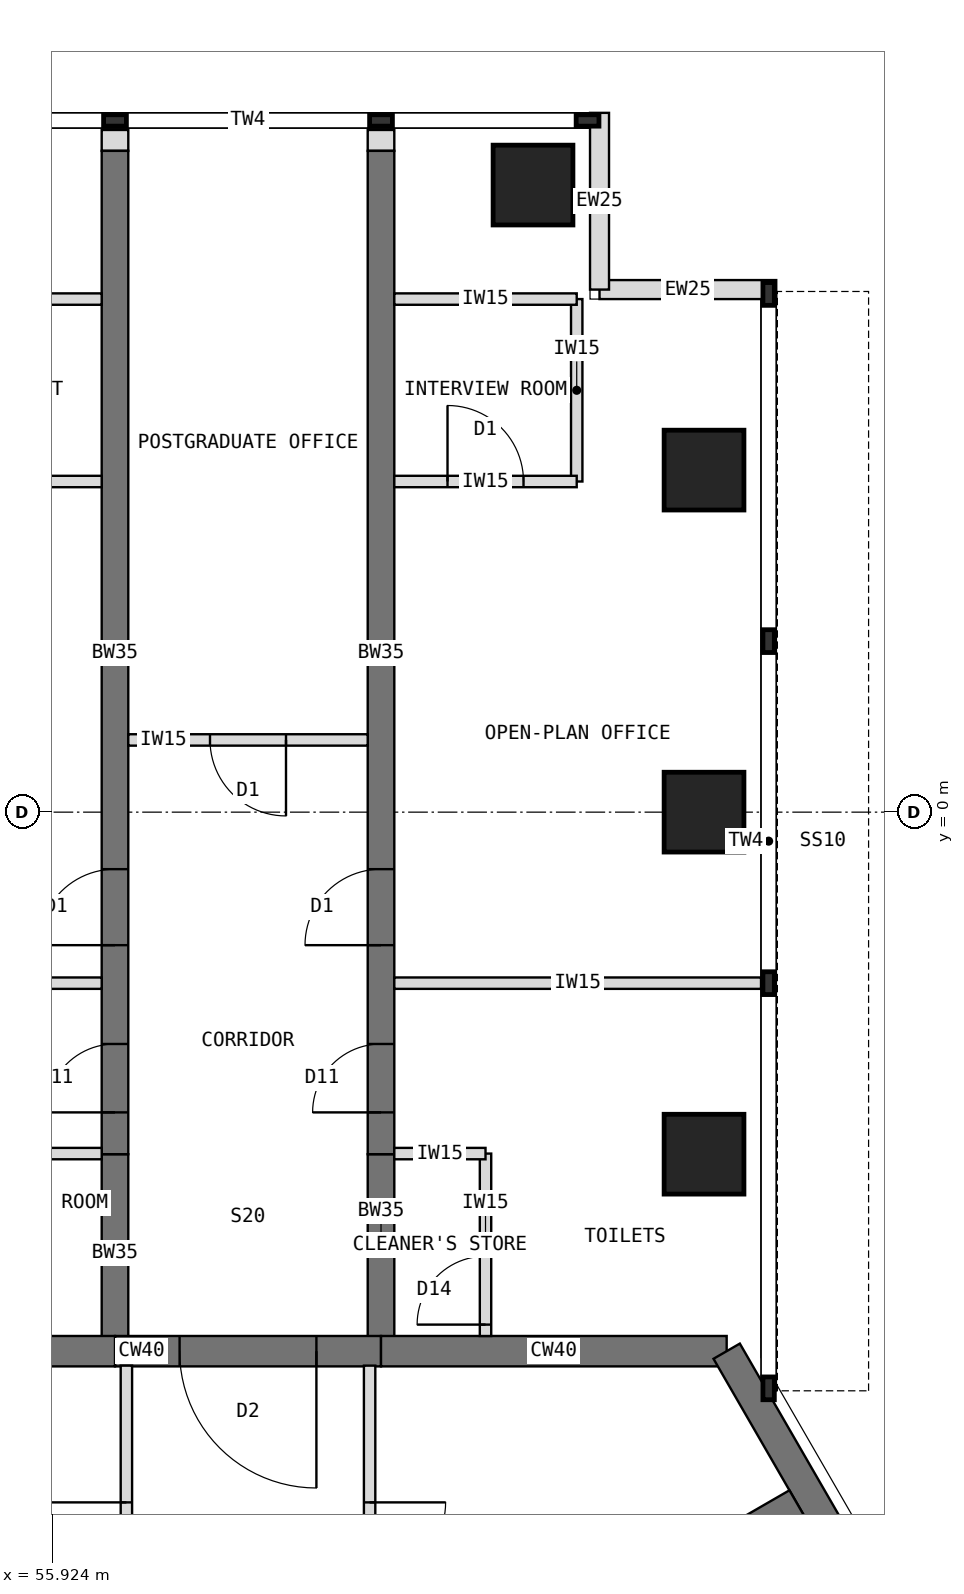
"""IFC4 building model, lengths in metres.
Left out: names, types, materials, properties, quantities, classifications, styles, units other than length and angle.
Written with IfcOpenShell. Run it as: python <this file> out.ifc"""

import sys

from ifc_helpers import new_model, si_unit, direction, frame, frame_2d, origin, origin_2d, place, context, subcontext, project, spatial, rectangle, extrude, element, fill, save


model = new_model("IFC4")
c1 = context("Model", 3, precision=1e-05, world=origin(), true_north=direction((0.0, 1.0)))
c2 = subcontext(c1, "Body", "Model", "MODEL_VIEW")
j1 = project(units=[si_unit("LENGTHUNIT", "METRE"), si_unit("PLANEANGLEUNIT", "RADIAN")], contexts=[c1])
p1 = place(None, origin())
s1 = spatial("IfcSite", under=j1, at=p1, CompositionType="ELEMENT")
p2 = place(p1, origin())
s2 = spatial("IfcBuilding", under=s1, at=p2, CompositionType="ELEMENT")
p3 = place(p2, frame((0.0, 0.0, 251.5)))
s3 = spatial("IfcBuildingStorey", under=s2, at=p3, CompositionType="ELEMENT", Elevation=251.5)
p4 = place(p3, frame((64.798, -7.092, 0.0), z_axis=(0.0, 0.0, 1.0), x_axis=(-1.0, 0.0, 0.0)))
e1 = element("IfcWall", 1, at=p4, inside=s3, PredefinedType="SHEAR", context=c2, shape_type="SweptSolid", body=[
    extrude(rectangle(XDim=4.548, YDim=0.4, at=frame_2d((2.274, 0.0))), origin(), (0.0, 0.0, 1.0), 4.0),
])
p5 = place(p3, frame((60.25, -7.092, 0.0), z_axis=(0.0, 0.0, 1.0), x_axis=(-1.0, 0.0, 0.0)))
e2 = element("IfcWall", 2, at=p5, inside=s3, PredefinedType="SHEAR", context=c2, shape_type="SweptSolid", body=[
    extrude(rectangle(XDim=3.5, YDim=0.4, at=frame_2d((1.75, 0.0))), origin(), (0.0, 0.0, 1.0), 4.0),
])
p6 = place(p5, frame((0.85, 0.0, 0.0)))
e3 = element("IfcOpeningElement", 3, at=p6, cuts=e2, PredefinedType="OPENING", context=c2, shape_type="SweptSolid", body=[
    extrude(rectangle(XDim=1.8, YDim=2.1, at=frame_2d((0.9, 1.05))), frame((0.0, 0.21, 0.0), z_axis=(0.0, -1.0, 0.0), x_axis=(1.0, 0.0, 0.0)), (0.0, 0.0, 1.0), 0.42),
])
p7 = place(p3, frame((56.75, -7.092, 0.0), z_axis=(0.0, 0.0, 1.0), x_axis=(-1.0, 0.0, 0.0)))
e4 = element("IfcWall", 4, at=p7, inside=s3, PredefinedType="SHEAR", context=c2, shape_type="SweptSolid", body=[
    extrude(rectangle(XDim=4.548, YDim=0.4, at=frame_2d((2.274, 0.0))), origin(), (0.0, 0.0, 1.0), 4.0),
])
p8 = place(p3, frame((71.096, -18.0, 0.0), z_axis=(0.0, 0.0, 1.0), x_axis=(-0.500005998175, 0.866021940709, 0.0)))
e5 = element("IfcWall", 5, at=p8, inside=s3, PredefinedType="SHEAR", context=c2, shape_type="SweptSolid", body=[
    extrude(rectangle(XDim=12.596, YDim=0.4, at=frame_2d((6.298, 0.0))), origin(), (0.0, 0.0, 1.0), 4.0),
])
p9 = place(p3, frame((56.75, -7.092, 0.0), z_axis=(0.0, 0.0, 1.0), x_axis=(0.0, 1.0, 0.0)))
e6 = element("IfcWall", 6, at=p9, inside=s3, PredefinedType="SHEAR", context=c2, shape_type="SweptSolid", body=[
    extrude(rectangle(XDim=2.592, YDim=0.35, at=frame_2d((1.296, 0.0))), origin(), (0.0, 0.0, 1.0), 4.0),
])
p10 = place(p3, frame((56.75, -4.5, 0.0), z_axis=(0.0, 0.0, 1.0), x_axis=(0.0, 1.0, 0.0)))
e7 = element("IfcWall", 7, at=p10, inside=s3, PredefinedType="SHEAR", context=c2, shape_type="SweptSolid", body=[
    extrude(rectangle(XDim=13.2, YDim=0.35, at=frame_2d((6.6, 0.0))), origin(), (0.0, 0.0, 1.0), 4.0),
])
p11 = place(p10, frame((0.55, 0.0, 0.0)))
e8 = element("IfcOpeningElement", 8, at=p11, cuts=e7, PredefinedType="OPENING", context=c2, shape_type="SweptSolid", body=[
    extrude(rectangle(XDim=0.9, YDim=2.1, at=frame_2d((0.45, 1.05))), frame((0.0, 0.185, 0.0), z_axis=(0.0, -1.0, 0.0), x_axis=(1.0, 0.0, 0.0)), (0.0, 0.0, 1.0), 0.37),
])
p12 = place(p10, frame((2.75, 0.0, 0.0)))
e9 = element("IfcOpeningElement", 9, at=p12, cuts=e7, PredefinedType="OPENING", context=c2, shape_type="SweptSolid", body=[
    extrude(rectangle(XDim=1.0, YDim=2.1, at=frame_2d((0.5, 1.05))), frame((0.0, 0.185, 0.0), z_axis=(0.0, -1.0, 0.0), x_axis=(1.0, 0.0, 0.0)), (0.0, 0.0, 1.0), 0.37),
])
p13 = place(p3, frame((60.25, -7.092, 0.0), z_axis=(0.0, 0.0, 1.0), x_axis=(0.0, 1.0, 0.0)))
e10 = element("IfcWall", 10, at=p13, inside=s3, PredefinedType="SHEAR", context=c2, shape_type="SweptSolid", body=[
    extrude(rectangle(XDim=2.592, YDim=0.35, at=frame_2d((1.296, 0.0))), origin(), (0.0, 0.0, 1.0), 4.0),
])
p14 = place(p3, frame((60.25, -4.5, 0.0), z_axis=(0.0, 0.0, 1.0), x_axis=(0.0, 1.0, 0.0)))
e11 = element("IfcWall", 11, at=p14, inside=s3, PredefinedType="SHEAR", context=c2, shape_type="SweptSolid", body=[
    extrude(rectangle(XDim=13.2, YDim=0.35, at=frame_2d((6.6, 0.0))), origin(), (0.0, 0.0, 1.0), 4.0),
])
p15 = place(p14, frame((0.55, 0.0, 0.0)))
e12 = element("IfcOpeningElement", 12, at=p15, cuts=e11, PredefinedType="OPENING", context=c2, shape_type="SweptSolid", body=[
    extrude(rectangle(XDim=0.9, YDim=2.1, at=frame_2d((0.45, 1.05))), frame((0.0, 0.185, 0.0), z_axis=(0.0, -1.0, 0.0), x_axis=(1.0, 0.0, 0.0)), (0.0, 0.0, 1.0), 0.37),
])
p16 = place(p14, frame((2.75, 0.0, 0.0)))
e13 = element("IfcOpeningElement", 13, at=p16, cuts=e11, PredefinedType="OPENING", context=c2, shape_type="SweptSolid", body=[
    extrude(rectangle(XDim=1.0, YDim=2.1, at=frame_2d((0.5, 1.05))), frame((0.0, 0.185, 0.0), z_axis=(0.0, -1.0, 0.0), x_axis=(1.0, 0.0, 0.0)), (0.0, 0.0, 1.0), 0.37),
])
for number, where, z_axis, x_axis in (
    (14, (64.5, -4.5, 0.0), (0.0, 0.0, 1.0), (1.0, 0.0, 0.0)),
    (15, (64.5, 0.0, 0.0), (0.0, 0.0, 1.0), (1.0, 0.0, 0.0)),
    (16, (64.5, 4.5, 0.0), (0.0, 0.0, 1.0), (1.0, 0.0, 0.0)),
    (17, (62.25, 8.25, 0.0), (0.0, 0.0, 1.0), (1.0, 0.0, 0.0)),
):
    element("IfcColumn", number, at=place(p3, frame(where, z_axis=z_axis, x_axis=x_axis)), inside=s3, PredefinedType="COLUMN", context=c2, shape_type="SweptSolid", body=[
        extrude(rectangle(XDim=1.05, YDim=1.05, at=origin_2d()), origin(), (0.0, 0.0, 1.0), 4.0),
    ])
for number, where, z_axis, x_axis in (
    (18, (65.45, 6.875, 0.0), (0.0, 0.0, 1.0), (-1.0, 0.0, 0.0)),
    (19, (63.125, 6.875, 0.0), (0.0, 0.0, 1.0), (0.0, 1.0, 0.0)),
):
    element("IfcWall", number, at=place(p3, frame(where, z_axis=z_axis, x_axis=x_axis)), inside=s3, PredefinedType="STANDARD", context=c2, shape_type="SweptSolid", body=[
        extrude(rectangle(XDim=2.325, YDim=0.25, at=frame_2d((1.163, 0.0))), origin(), (0.0, 0.0, 1.0), 3.8),
    ])
for number, where, z_axis, x_axis in (
    (20, (56.75, 8.7, 0.0), (0.0, 0.0, 1.0), (0.0, 1.0, 0.0)),
    (21, (60.25, 8.7, 0.0), (0.0, 0.0, 1.0), (0.0, 1.0, 0.0)),
):
    element("IfcWall", number, at=place(p3, frame(where, z_axis=z_axis, x_axis=x_axis)), inside=s3, PredefinedType="PARTITIONING", context=c2, shape_type="SweptSolid", body=[
        extrude(rectangle(XDim=0.275, YDim=0.35, at=frame_2d((0.138, 0.0))), origin(), (0.0, 0.0, 1.0), 3.8),
    ])
for number, where, z_axis, x_axis in (
    (22, (56.48, -12.099, 0.0), (0.0, 0.0, 1.0), (-0.866, 0.5, 0.0)),
    (23, (60.52, -12.099, 0.0), (0.0, 0.0, 1.0), (0.866, 0.5, 0.0)),
):
    element("IfcWall", number, at=place(p3, frame(where, z_axis=z_axis, x_axis=x_axis)), inside=s3, PredefinedType="SHEAR", context=c2, shape_type="SweptSolid", body=[
        extrude(rectangle(XDim=6.008, YDim=0.4, at=frame_2d((3.004, 0.0))), origin(), (0.0, 0.0, 1.0), 4.0),
    ])
p17 = place(p3, frame((56.575, -2.25, 0.0), z_axis=(0.0, 0.0, 1.0), x_axis=(-1.0, 0.0, 0.0)))
e24 = element("IfcWall", 24, at=p17, inside=s3, PredefinedType="PARTITIONING", context=c2, shape_type="SweptSolid", body=[
    extrude(rectangle(XDim=4.825, YDim=0.15, at=frame_2d((2.413, 0.0))), origin(), (0.0, 0.0, 1.0), 3.8),
])
p18 = place(p3, frame((56.575, 4.35, 0.0), z_axis=(0.0, 0.0, 1.0), x_axis=(-1.0, 0.0, 0.0)))
e25 = element("IfcWall", 25, at=p18, inside=s3, PredefinedType="PARTITIONING", context=c2, shape_type="SweptSolid", body=[
    extrude(rectangle(XDim=2.4, YDim=0.15, at=frame_2d((1.2, 0.0))), origin(), (0.0, 0.0, 1.0), 3.8),
])
p19 = place(p18, frame((0.7, 0.0, 0.0)))
e26 = element("IfcOpeningElement", 26, at=p19, cuts=e25, PredefinedType="OPENING", context=c2, shape_type="SweptSolid", body=[
    extrude(rectangle(XDim=1.0, YDim=2.1, at=frame_2d((0.5, 1.05))), frame((0.0, 0.085, 0.0), z_axis=(0.0, -1.0, 0.0), x_axis=(1.0, 0.0, 0.0)), (0.0, 0.0, 1.0), 0.17),
])
p20 = place(p3, frame((56.575, 6.75, 0.0), z_axis=(0.0, 0.0, 1.0), x_axis=(-1.0, 0.0, 0.0)))
e27 = element("IfcWall", 27, at=p20, inside=s3, PredefinedType="PARTITIONING", context=c2, shape_type="SweptSolid", body=[
    extrude(rectangle(XDim=2.4, YDim=0.15, at=frame_2d((1.2, 0.0))), origin(), (0.0, 0.0, 1.0), 3.8),
])
p21 = place(p3, frame((56.575, -4.492, 0.0), z_axis=(0.0, 0.0, 1.0), x_axis=(-1.0, 0.0, 0.0)))
e28 = element("IfcWall", 28, at=p21, inside=s3, PredefinedType="PARTITIONING", context=c2, shape_type="SweptSolid", body=[
    extrude(rectangle(XDim=3.2, YDim=0.15, at=frame_2d((1.6, 0.0))), origin(), (0.0, 0.0, 1.0), 3.267),
])
p22 = place(p3, frame((60.425, -2.25, 0.0), z_axis=(0.0, 0.0, 1.0), x_axis=(1.0, 0.0, 0.0)))
e29 = element("IfcWall", 29, at=p22, inside=s3, PredefinedType="PARTITIONING", context=c2, shape_type="SweptSolid", body=[
    extrude(rectangle(XDim=4.825, YDim=0.15, at=frame_2d((2.413, 0.0))), origin(), (0.0, 0.0, 1.0), 3.8),
])
p23 = place(p3, frame((62.825, 4.35, 0.0), z_axis=(0.0, 0.0, 1.0), x_axis=(0.0, 1.0, 0.0)))
e30 = element("IfcWall", 30, at=p23, inside=s3, PredefinedType="PARTITIONING", context=c2, shape_type="SweptSolid", body=[
    extrude(rectangle(XDim=2.4, YDim=0.15, at=frame_2d((1.2, 0.0))), origin(), (0.0, 0.0, 1.0), 3.8),
])
p24 = place(p3, frame((60.425, 4.35, 0.0), z_axis=(0.0, 0.0, 1.0), x_axis=(1.0, 0.0, 0.0)))
e31 = element("IfcWall", 31, at=p24, inside=s3, PredefinedType="PARTITIONING", context=c2, shape_type="SweptSolid", body=[
    extrude(rectangle(XDim=2.4, YDim=0.15, at=frame_2d((1.2, 0.0))), origin(), (0.0, 0.0, 1.0), 3.8),
])
p25 = place(p24, frame((0.7, 0.0, 0.0)))
e32 = element("IfcOpeningElement", 32, at=p25, cuts=e31, PredefinedType="OPENING", context=c2, shape_type="SweptSolid", body=[
    extrude(rectangle(XDim=1.0, YDim=2.1, at=frame_2d((0.5, 1.05))), frame((0.0, 0.085, 0.0), z_axis=(0.0, -1.0, 0.0), x_axis=(1.0, 0.0, 0.0)), (0.0, 0.0, 1.0), 0.17),
])
p26 = place(p3, frame((60.425, 6.75, 0.0), z_axis=(0.0, 0.0, 1.0), x_axis=(1.0, 0.0, 0.0)))
e33 = element("IfcWall", 33, at=p26, inside=s3, PredefinedType="PARTITIONING", context=c2, shape_type="SweptSolid", body=[
    extrude(rectangle(XDim=2.4, YDim=0.15, at=frame_2d((1.2, 0.0))), origin(), (0.0, 0.0, 1.0), 3.8),
])
p27 = place(p3, frame((61.625, -6.892, 0.0), z_axis=(0.0, 0.0, 1.0), x_axis=(0.0, 1.0, 0.0)))
e34 = element("IfcWall", 34, at=p27, inside=s3, PredefinedType="PARTITIONING", context=c2, shape_type="SweptSolid", body=[
    extrude(rectangle(XDim=2.4, YDim=0.15, at=frame_2d((1.2, 0.0))), origin(), (0.0, 0.0, 1.0), 3.8),
])
p28 = place(p27, frame((0.15, 0.0, 0.0)))
e35 = element("IfcOpeningElement", 35, at=p28, cuts=e34, PredefinedType="OPENING", context=c2, shape_type="SweptSolid", body=[
    extrude(rectangle(XDim=0.9, YDim=2.1, at=frame_2d((0.45, 1.05))), frame((0.0, 0.085, 0.0), z_axis=(0.0, -1.0, 0.0), x_axis=(1.0, 0.0, 0.0)), (0.0, 0.0, 1.0), 0.17),
])
p29 = place(p3, frame((60.425, -4.492, 0.0), z_axis=(0.0, 0.0, 1.0), x_axis=(1.0, 0.0, 0.0)))
e36 = element("IfcWall", 36, at=p29, inside=s3, PredefinedType="PARTITIONING", context=c2, shape_type="SweptSolid", body=[
    extrude(rectangle(XDim=1.2, YDim=0.15, at=frame_2d((0.6, 0.0))), origin(), (0.0, 0.0, 1.0), 3.267),
])
p30 = place(p3, frame((56.9, -11.9, 0.0), z_axis=(0.0, 0.0, 1.0), x_axis=(0.0, 1.0, 0.0)))
e37 = element("IfcWall", 37, at=p30, inside=s3, PredefinedType="PARTITIONING", context=c2, shape_type="SweptSolid", body=[
    extrude(rectangle(XDim=4.618, YDim=0.15, at=frame_2d((2.309, 0.0))), origin(), (0.0, 0.0, 1.0), 3.8),
])
p31 = place(p30, frame((1.819, 0.0, 0.0)))
e38 = element("IfcOpeningElement", 38, at=p31, cuts=e37, PredefinedType="OPENING", context=c2, shape_type="SweptSolid", body=[
    extrude(rectangle(XDim=1.0, YDim=2.1, at=frame_2d((0.5, 1.05))), frame((0.0, 0.085, 0.0), z_axis=(0.0, -1.0, 0.0), x_axis=(1.0, 0.0, 0.0)), (0.0, 0.0, 1.0), 0.17),
])
p32 = place(p3, frame((60.1, -7.282, 0.0), z_axis=(0.0, 0.0, 1.0), x_axis=(0.0, -1.0, 0.0)))
e39 = element("IfcWall", 39, at=p32, inside=s3, PredefinedType="PARTITIONING", context=c2, shape_type="SweptSolid", body=[
    extrude(rectangle(XDim=4.618, YDim=0.15, at=frame_2d((2.309, 0.0))), origin(), (0.0, 0.0, 1.0), 3.8),
])
p33 = place(p32, frame((1.799, 0.0, 0.0)))
e40 = element("IfcOpeningElement", 40, at=p33, cuts=e39, PredefinedType="OPENING", context=c2, shape_type="SweptSolid", body=[
    extrude(rectangle(XDim=1.0, YDim=2.1, at=frame_2d((0.5, 1.05))), frame((0.0, 0.085, 0.0), z_axis=(0.0, -1.0, 0.0), x_axis=(1.0, 0.0, 0.0)), (0.0, 0.0, 1.0), 0.17),
])
p34 = place(p3, frame((60.075, 0.95, 0.0), z_axis=(0.0, 0.0, 1.0), x_axis=(-1.0, 0.0, 0.0)))
e41 = element("IfcWall", 41, at=p34, inside=s3, PredefinedType="PARTITIONING", context=c2, shape_type="SweptSolid", body=[
    extrude(rectangle(XDim=3.15, YDim=0.15, at=frame_2d((1.575, 0.0))), origin(), (0.0, 0.0, 1.0), 3.8),
])
p35 = place(p34, frame((1.075, 0.0, 0.0)))
e42 = element("IfcOpeningElement", 42, at=p35, cuts=e41, PredefinedType="OPENING", context=c2, shape_type="SweptSolid", body=[
    extrude(rectangle(XDim=1.0, YDim=2.1, at=frame_2d((0.5, 1.05))), frame((0.0, 0.085, 0.0), z_axis=(0.0, -1.0, 0.0), x_axis=(1.0, 0.0, 0.0)), (0.0, 0.0, 1.0), 0.17),
])
p36 = place(p6, origin())
e43 = element("IfcDoor", 43, at=p36, inside=s3, OperationType="DOUBLE_DOOR_DOUBLE_SWING", PredefinedType="DOOR", context=c2, shape_type="SweptSolid", body=[
    extrude(rectangle(XDim=1.8, YDim=2.1, at=frame_2d((0.9, 1.05))), frame((0.0, 0.025, 0.0), z_axis=(0.0, -1.0, 0.0), x_axis=(1.0, 0.0, 0.0)), (0.0, 0.0, 1.0), 0.05),
])
fill(e3, e43)
p37 = place(p25, origin())
e44 = element("IfcDoor", 44, at=p37, inside=s3, OperationType="SINGLE_SWING_LEFT", PredefinedType="DOOR", context=c2, shape_type="SweptSolid", body=[
    extrude(rectangle(XDim=1.0, YDim=2.1, at=frame_2d((0.5, 1.05))), frame((0.0, 0.025, 0.0), z_axis=(0.0, -1.0, 0.0), x_axis=(1.0, 0.0, 0.0)), (0.0, 0.0, 1.0), 0.05),
])
fill(e32, e44)
p38 = place(p28, origin())
e45 = element("IfcDoor", 45, at=p38, inside=s3, OperationType="SINGLE_SWING_LEFT", PredefinedType="DOOR", context=c2, shape_type="SweptSolid", body=[
    extrude(rectangle(XDim=0.9, YDim=2.1, at=frame_2d((0.45, 1.05))), frame((0.0, 0.025, 0.0), z_axis=(0.0, -1.0, 0.0), x_axis=(1.0, 0.0, 0.0)), (0.0, 0.0, 1.0), 0.05),
])
fill(e35, e45)
p39 = place(p33, origin())
e46 = element("IfcDoor", 46, at=p39, inside=s3, OperationType="SINGLE_SWING_LEFT", PredefinedType="DOOR", context=c2, shape_type="SweptSolid", body=[
    extrude(rectangle(XDim=1.0, YDim=2.1, at=frame_2d((0.5, 1.05))), frame((0.0, 0.025, 0.0), z_axis=(0.0, -1.0, 0.0), x_axis=(1.0, 0.0, 0.0)), (0.0, 0.0, 1.0), 0.05),
])
fill(e40, e46)
p40 = place(p31, origin())
e47 = element("IfcDoor", 47, at=p40, inside=s3, OperationType="SINGLE_SWING_RIGHT", PredefinedType="DOOR", context=c2, shape_type="SweptSolid", body=[
    extrude(rectangle(XDim=1.0, YDim=2.1, at=frame_2d((0.5, 1.05))), frame((0.0, 0.025, 0.0), z_axis=(0.0, -1.0, 0.0), x_axis=(1.0, 0.0, 0.0)), (0.0, 0.0, 1.0), 0.05),
])
fill(e38, e47)
p41 = place(p35, origin())
e48 = element("IfcDoor", 48, at=p41, inside=s3, OperationType="SINGLE_SWING_LEFT", PredefinedType="DOOR", context=c2, shape_type="SweptSolid", body=[
    extrude(rectangle(XDim=1.0, YDim=2.1, at=frame_2d((0.5, 1.05))), frame((0.0, 0.025, 0.0), z_axis=(0.0, -1.0, 0.0), x_axis=(1.0, 0.0, 0.0)), (0.0, 0.0, 1.0), 0.05),
])
fill(e42, e48)
p42 = place(p11, origin())
e49 = element("IfcDoor", 49, at=p42, inside=s3, OperationType="SINGLE_SWING_LEFT", PredefinedType="DOOR", context=c2, shape_type="SweptSolid", body=[
    extrude(rectangle(XDim=0.9, YDim=2.1, at=frame_2d((0.45, 1.05))), frame((0.0, 0.025, 0.0), z_axis=(0.0, -1.0, 0.0), x_axis=(1.0, 0.0, 0.0)), (0.0, 0.0, 1.0), 0.05),
])
fill(e8, e49)
p43 = place(p12, origin())
e50 = element("IfcDoor", 50, at=p43, inside=s3, OperationType="SINGLE_SWING_LEFT", PredefinedType="DOOR", context=c2, shape_type="SweptSolid", body=[
    extrude(rectangle(XDim=1.0, YDim=2.1, at=frame_2d((0.5, 1.05))), frame((0.0, 0.025, 0.0), z_axis=(0.0, -1.0, 0.0), x_axis=(1.0, 0.0, 0.0)), (0.0, 0.0, 1.0), 0.05),
])
fill(e9, e50)
p44 = place(p15, origin())
e51 = element("IfcDoor", 51, at=p44, inside=s3, OperationType="SINGLE_SWING_LEFT", PredefinedType="DOOR", context=c2, shape_type="SweptSolid", body=[
    extrude(rectangle(XDim=0.9, YDim=2.1, at=frame_2d((0.45, 1.05))), frame((0.0, 0.025, 0.0), z_axis=(0.0, -1.0, 0.0), x_axis=(1.0, 0.0, 0.0)), (0.0, 0.0, 1.0), 0.05),
])
fill(e12, e51)
p45 = place(p16, origin())
e52 = element("IfcDoor", 52, at=p45, inside=s3, OperationType="SINGLE_SWING_LEFT", PredefinedType="DOOR", context=c2, shape_type="SweptSolid", body=[
    extrude(rectangle(XDim=1.0, YDim=2.1, at=frame_2d((0.5, 1.05))), frame((0.0, 0.025, 0.0), z_axis=(0.0, -1.0, 0.0), x_axis=(1.0, 0.0, 0.0)), (0.0, 0.0, 1.0), 0.05),
])
fill(e13, e52)
save(model, sys.argv[1])
